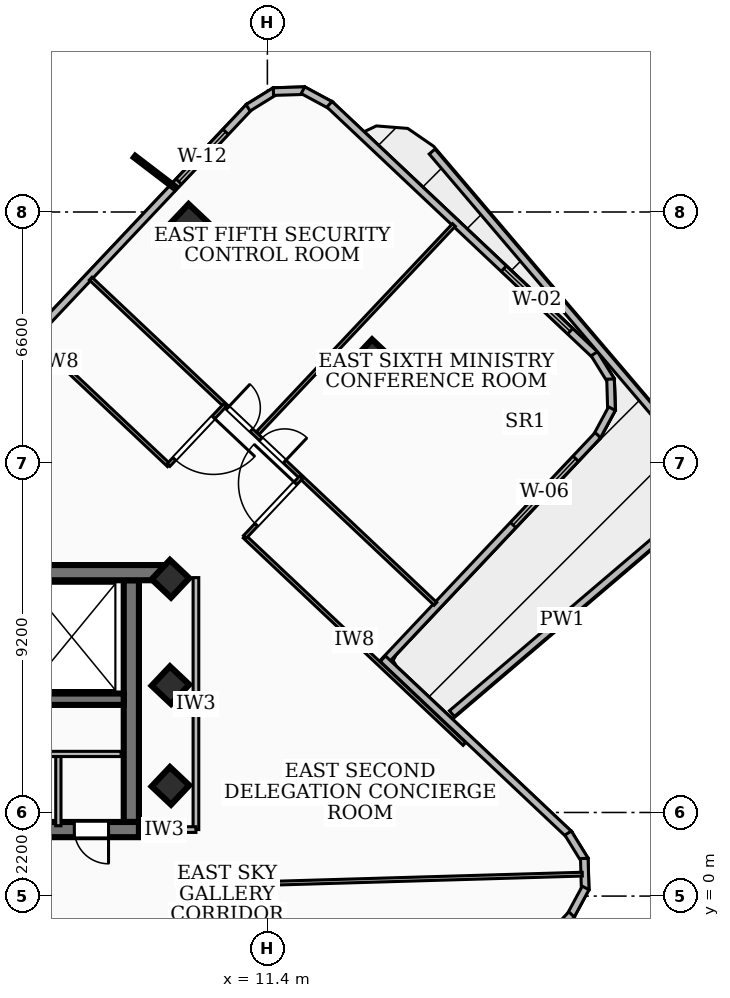
"""IFC4 building model, lengths in metres.
Left out: names, types, materials, properties, quantities, classifications, styles, units other than length and angle.
Written with IfcOpenShell. Run it as: python <this file> out.ifc"""

import sys

from ifc_helpers import new_model, si_unit, direction, frame, frame_2d, origin, origin_2d, place, context, subcontext, project, spatial, rectangle, extrude, element, fill, save


model = new_model("IFC4")
c1 = context("Model", 3, precision=1e-05, world=origin(), true_north=direction((0.0, 1.0)))
c2 = subcontext(c1, "Body", "Model", "MODEL_VIEW")
j1 = project(units=[si_unit("LENGTHUNIT", "METRE"), si_unit("PLANEANGLEUNIT", "RADIAN")], contexts=[c1])
p1 = place(None, origin())
s1 = spatial("IfcSite", under=j1, at=p1, CompositionType="ELEMENT")
p2 = place(p1, origin())
s2 = spatial("IfcBuilding", under=s1, at=p2, CompositionType="ELEMENT")
p3 = place(p2, frame((0.0, 0.0, 244.08)))
s3 = spatial("IfcBuildingStorey", under=s2, at=p3, CompositionType="ELEMENT", Elevation=244.08)
p4 = place(p3, frame((-8.78, 8.51, 0.0), z_axis=(0.0, 0.0, 1.0), x_axis=(1.0, 0.0, 0.0)))
e1 = element("IfcWall", 1, at=p4, inside=s3, PredefinedType="SHEAR", context=c2, shape_type="SweptSolid", body=[
    extrude(rectangle(XDim=17.56, YDim=0.4, at=frame_2d((8.78, 0.0))), origin(), (0.0, 0.0, 1.0), 3.16),
])
p5 = place(p3, frame((8.02, 1.75, 0.0), z_axis=(0.0, 0.0, 1.0), x_axis=(-1.0, 0.0, 0.0)))
e2 = element("IfcWall", 2, at=p5, inside=s3, PredefinedType="SHEAR", context=c2, shape_type="SweptSolid", body=[
    extrude(rectangle(XDim=16.04, YDim=0.4, at=frame_2d((8.02, 0.0))), origin(), (0.0, 0.0, 1.0), 3.16),
])
p6 = place(p5, frame((7.45, 0.0, 0.0)))
e3 = element("IfcOpeningElement", 3, at=p6, cuts=e2, PredefinedType="OPENING", context=c2, shape_type="SweptSolid", body=[
    extrude(rectangle(XDim=1.0, YDim=2.1, at=frame_2d((0.5, 1.05))), frame((0.0, 0.21, 0.0), z_axis=(0.0, -1.0, 0.0), x_axis=(1.0, 0.0, 0.0)), (0.0, 0.0, 1.0), 0.42),
])
p7 = place(p5, frame((14.285, 0.0, 0.0)))
e4 = element("IfcOpeningElement", 4, at=p7, cuts=e2, PredefinedType="OPENING", context=c2, shape_type="SweptSolid", body=[
    extrude(rectangle(XDim=1.05, YDim=2.15, at=frame_2d((0.525, 1.075))), frame((0.0, 0.21, 0.0), z_axis=(0.0, -1.0, 0.0), x_axis=(1.0, 0.0, 0.0)), (0.0, 0.0, 1.0), 0.42),
])
p8 = place(p5, frame((12.725, 0.0, 0.0)))
e5 = element("IfcOpeningElement", 5, at=p8, cuts=e2, PredefinedType="OPENING", context=c2, shape_type="SweptSolid", body=[
    extrude(rectangle(XDim=1.05, YDim=2.15, at=frame_2d((0.525, 1.075))), frame((0.0, 0.21, 0.0), z_axis=(0.0, -1.0, 0.0), x_axis=(1.0, 0.0, 0.0)), (0.0, 0.0, 1.0), 0.42),
])
p9 = place(p5, frame((11.165, 0.0, 0.0)))
e6 = element("IfcOpeningElement", 6, at=p9, cuts=e2, PredefinedType="OPENING", context=c2, shape_type="SweptSolid", body=[
    extrude(rectangle(XDim=1.05, YDim=2.15, at=frame_2d((0.525, 1.075))), frame((0.0, 0.21, 0.0), z_axis=(0.0, -1.0, 0.0), x_axis=(1.0, 0.0, 0.0)), (0.0, 0.0, 1.0), 0.42),
])
p10 = place(p5, frame((3.85, 0.0, 0.0)))
e7 = element("IfcOpeningElement", 7, at=p10, cuts=e2, PredefinedType="OPENING", context=c2, shape_type="SweptSolid", body=[
    extrude(rectangle(XDim=0.9, YDim=2.06, at=frame_2d((0.45, 1.03))), frame((0.0, 0.21, 0.0), z_axis=(0.0, -1.0, 0.0), x_axis=(1.0, 0.0, 0.0)), (0.0, 0.0, 1.0), 0.42),
])
p11 = place(p5, frame((2.35, 0.0, 0.0)))
e8 = element("IfcOpeningElement", 8, at=p11, cuts=e2, PredefinedType="OPENING", context=c2, shape_type="SweptSolid", body=[
    extrude(rectangle(XDim=0.9, YDim=2.06, at=frame_2d((0.45, 1.03))), frame((0.0, 0.21, 0.0), z_axis=(0.0, -1.0, 0.0), x_axis=(1.0, 0.0, 0.0)), (0.0, 0.0, 1.0), 0.42),
])
p12 = place(p5, frame((0.8, 0.0, 0.0)))
e9 = element("IfcOpeningElement", 9, at=p12, cuts=e2, PredefinedType="OPENING", context=c2, shape_type="SweptSolid", body=[
    extrude(rectangle(XDim=0.9, YDim=2.06, at=frame_2d((0.45, 1.03))), frame((0.0, 0.21, 0.0), z_axis=(0.0, -1.0, 0.0), x_axis=(1.0, 0.0, 0.0)), (0.0, 0.0, 1.0), 0.42),
])
p13 = place(p3, frame((7.82, 8.31, 0.0), z_axis=(0.0, 0.0, 1.0), x_axis=(0.0, -1.0, 0.0)))
e10 = element("IfcWall", 10, at=p13, inside=s3, PredefinedType="SHEAR", context=c2, shape_type="SweptSolid", body=[
    extrude(rectangle(XDim=6.36, YDim=0.4, at=frame_2d((3.18, 0.0))), origin(), (0.0, 0.0, 1.0), 3.16),
])
p14 = place(p3, frame((7.62, 5.18, 0.0), z_axis=(0.0, 0.0, 1.0), x_axis=(-1.0, 0.0, 0.0)))
e11 = element("IfcWall", 11, at=p14, inside=s3, PredefinedType="SOLIDWALL", context=c2, shape_type="SweptSolid", body=[
    extrude(rectangle(XDim=15.24, YDim=0.3, at=frame_2d((7.62, 0.0))), origin(), (0.0, 0.0, 1.0), 3.16),
])
p15 = place(p14, frame((5.77, 0.0, 0.0)))
e12 = element("IfcOpeningElement", 12, at=p15, cuts=e11, PredefinedType="OPENING", context=c2, shape_type="SweptSolid", body=[
    extrude(rectangle(XDim=1.1, YDim=2.15, at=frame_2d((0.55, 1.075))), frame((0.0, 0.16, 0.0), z_axis=(0.0, -1.0, 0.0), x_axis=(1.0, 0.0, 0.0)), (0.0, 0.0, 1.0), 0.32),
])
p16 = place(p14, frame((2.97, 0.0, 0.0)))
e13 = element("IfcOpeningElement", 13, at=p16, cuts=e11, PredefinedType="OPENING", context=c2, shape_type="SweptSolid", body=[
    extrude(rectangle(XDim=1.1, YDim=2.15, at=frame_2d((0.55, 1.075))), frame((0.0, 0.16, 0.0), z_axis=(0.0, -1.0, 0.0), x_axis=(1.0, 0.0, 0.0)), (0.0, 0.0, 1.0), 0.32),
])
p17 = place(p14, frame((7.97, 0.0, 0.0)))
e14 = element("IfcOpeningElement", 14, at=p17, cuts=e11, PredefinedType="OPENING", context=c2, shape_type="SweptSolid", body=[
    extrude(rectangle(XDim=1.0, YDim=2.1, at=frame_2d((0.5, 1.05))), frame((0.0, 0.16, 0.0), z_axis=(0.0, -1.0, 0.0), x_axis=(1.0, 0.0, 0.0)), (0.0, 0.0, 1.0), 0.32),
])
for number, where, z_axis, x_axis in (
    (15, (8.85, 2.9, 0.0), (0.0, 0.0, 1.0), (0.686, 0.728, 0.0)),
    (16, (8.85, 5.55, 0.0), (0.0, 0.0, 1.0), (0.686, 0.728, 0.0)),
    (17, (8.85, 8.35, 0.0), (0.0, 0.0, 1.0), (0.686, 0.728, 0.0)),
    (18, (14.169, 14.152, 0.0), (0.0, 0.0, 1.0), (0.686, 0.728, 0.0)),
    (19, (9.341, 17.714, 0.0), (0.0, 0.0, 1.0), (0.686, 0.728, 0.0)),
):
    element("IfcColumn", number, at=place(p3, frame(where, z_axis=z_axis, x_axis=x_axis)), inside=s3, PredefinedType="COLUMN", context=c2, shape_type="SweptSolid", body=[
        extrude(rectangle(XDim=0.7, YDim=0.7, at=origin_2d()), origin(), (0.0, 0.0, 1.0), 3.42),
    ])
p18 = place(p3, frame((5.275, 14.778, 0.0), z_axis=(0.0, 0.0, 1.0), x_axis=(0.686187598971, 0.72742462085, 0.0)))
e20 = element("IfcWall", 20, at=p18, inside=s3, PredefinedType="SOLIDWALL", context=c2, shape_type="SweptSolid", body=[
    extrude(rectangle(XDim=8.241, YDim=0.2, at=frame_2d((4.121, 0.0))), origin(), (0.0, 0.0, 1.0), 3.16),
])
p19 = place(p18, frame((5.528, 0.0, 0.85)))
e21 = element("IfcOpeningElement", 21, at=p19, cuts=e20, PredefinedType="OPENING", context=c2, shape_type="SweptSolid", body=[
    extrude(rectangle(XDim=1.8, YDim=1.6, at=frame_2d((0.9, 0.8))), frame((0.0, 0.11, 0.0), z_axis=(0.0, -1.0, 0.0), x_axis=(1.0, 0.0, 0.0)), (0.0, 0.0, 1.0), 0.22),
])
p20 = place(p3, frame((10.892, 20.742, 0.0), z_axis=(0.0, 0.0, 1.0), x_axis=(0.850997215859, 0.52517019965, 0.0)))
e22 = element("IfcWall", 22, at=p20, inside=s3, PredefinedType="SOLIDWALL", context=c2, shape_type="SweptSolid", body=[
    extrude(rectangle(XDim=0.838, YDim=0.2, at=frame_2d((0.419, 0.0))), origin(), (0.0, 0.0, 1.0), 3.16),
])
p21 = place(p3, frame((11.559, 21.168, 0.0), z_axis=(0.0, 0.0, 1.0), x_axis=(0.999534635062, 0.03050431627, 0.0)))
e23 = element("IfcWall", 23, at=p21, inside=s3, PredefinedType="SOLIDWALL", context=c2, shape_type="SweptSolid", body=[
    extrude(rectangle(XDim=0.824, YDim=0.2, at=frame_2d((0.412, 0.0))), origin(), (0.0, 0.0, 1.0), 3.16),
])
p22 = place(p3, frame((12.336, 21.204, 0.0), z_axis=(0.0, 0.0, 1.0), x_axis=(0.880078176624, -0.474828814447, 0.0)))
e24 = element("IfcWall", 24, at=p22, inside=s3, PredefinedType="SOLIDWALL", context=c2, shape_type="SweptSolid", body=[
    extrude(rectangle(XDim=0.839, YDim=0.2, at=frame_2d((0.419, 0.0))), origin(), (0.0, 0.0, 1.0), 3.16),
])
p23 = place(p3, frame((13.034, 20.835, 0.0), z_axis=(0.0, 0.0, 1.0), x_axis=(0.727480137234, -0.686128741513, 0.0)))
e25 = element("IfcWall", 25, at=p23, inside=s3, PredefinedType="SOLIDWALL", context=c2, shape_type="SweptSolid", body=[
    extrude(rectangle(XDim=9.624, YDim=0.2, at=frame_2d((4.812, 0.0))), origin(), (0.0, 0.0, 1.0), 3.16),
])
p24 = place(p23, frame((6.306, 0.0, 0.85)))
e26 = element("IfcOpeningElement", 26, at=p24, cuts=e25, PredefinedType="OPENING", context=c2, shape_type="SweptSolid", body=[
    extrude(rectangle(XDim=2.4, YDim=2.1, at=frame_2d((1.2, 1.05))), frame((0.0, 0.11, 0.0), z_axis=(0.0, -1.0, 0.0), x_axis=(1.0, 0.0, 0.0)), (0.0, 0.0, 1.0), 0.22),
])
p25 = place(p3, frame((20.004, 14.27, 0.0), z_axis=(0.0, 0.0, 1.0), x_axis=(0.525902672248, -0.85054475445, 0.0)))
e27 = element("IfcWall", 27, at=p25, inside=s3, PredefinedType="SOLIDWALL", context=c2, shape_type="SweptSolid", body=[
    extrude(rectangle(XDim=0.837, YDim=0.2, at=frame_2d((0.418, 0.0))), origin(), (0.0, 0.0, 1.0), 3.16),
])
p26 = place(p3, frame((20.43, 13.604, 0.0), z_axis=(0.0, 0.0, 1.0), x_axis=(0.030468239346, -0.999535735425, 0.0)))
e28 = element("IfcWall", 28, at=p26, inside=s3, PredefinedType="SOLIDWALL", context=c2, shape_type="SweptSolid", body=[
    extrude(rectangle(XDim=0.825, YDim=0.2, at=frame_2d((0.413, 0.0))), origin(), (0.0, 0.0, 1.0), 3.16),
])
p27 = place(p3, frame((20.466, 12.826, 0.0), z_axis=(0.0, 0.0, 1.0), x_axis=(-0.474603278561, -0.880199822755, 0.0)))
e29 = element("IfcWall", 29, at=p27, inside=s3, PredefinedType="SOLIDWALL", context=c2, shape_type="SweptSolid", body=[
    extrude(rectangle(XDim=0.838, YDim=0.2, at=frame_2d((0.419, 0.0))), origin(), (0.0, 0.0, 1.0), 3.16),
])
p28 = place(p3, frame((20.097, 12.128, 0.0), z_axis=(0.0, 0.0, 1.0), x_axis=(-0.686187598971, -0.72742462085, 0.0)))
e30 = element("IfcWall", 30, at=p28, inside=s3, PredefinedType="SOLIDWALL", context=c2, shape_type="SweptSolid", body=[
    extrude(rectangle(XDim=8.241, YDim=0.2, at=frame_2d((4.121, 0.0))), origin(), (0.0, 0.0, 1.0), 3.16),
])
p29 = place(p28, frame((0.85, 0.0, 0.85)))
e31 = element("IfcOpeningElement", 31, at=p29, cuts=e30, PredefinedType="OPENING", context=c2, shape_type="SweptSolid", body=[
    extrude(rectangle(XDim=2.4, YDim=1.85, at=frame_2d((1.2, 0.925))), frame((0.0, 0.11, 0.0), z_axis=(0.0, -1.0, 0.0), x_axis=(1.0, 0.0, 0.0)), (0.0, 0.0, 1.0), 0.22),
])
p30 = place(p3, frame((14.439, 6.246, 0.0), z_axis=(0.0, 0.0, 1.0), x_axis=(0.727497998064, -0.686109803758, 0.0)))
e32 = element("IfcWall", 32, at=p30, inside=s3, PredefinedType="SOLIDWALL", context=c2, shape_type="SweptSolid", body=[
    extrude(rectangle(XDim=6.742, YDim=0.2, at=frame_2d((3.371, 0.0))), origin(), (0.0, 0.0, 1.0), 3.16),
])
p31 = place(p3, frame((19.313, 1.658, 0.0), z_axis=(0.0, 0.0, 1.0), x_axis=(0.52517019965, -0.850997215859, 0.0)))
e33 = element("IfcWall", 33, at=p31, inside=s3, PredefinedType="SOLIDWALL", context=c2, shape_type="SweptSolid", body=[
    extrude(rectangle(XDim=0.838, YDim=0.2, at=frame_2d((0.419, 0.0))), origin(), (0.0, 0.0, 1.0), 3.16),
])
p32 = place(p3, frame((19.739, 0.991, 0.0), z_axis=(0.0, 0.0, 1.0), x_axis=(0.029024803491, -0.999578691641, 0.0)))
e34 = element("IfcWall", 34, at=p32, inside=s3, PredefinedType="SOLIDWALL", context=c2, shape_type="SweptSolid", body=[
    extrude(rectangle(XDim=0.824, YDim=0.2, at=frame_2d((0.412, 0.0))), origin(), (0.0, 0.0, 1.0), 3.16),
])
p33 = place(p3, frame((19.774, 0.214, 0.0), z_axis=(0.0, 0.0, 1.0), x_axis=(-0.474603278561, -0.880199822755, 0.0)))
e35 = element("IfcWall", 35, at=p33, inside=s3, PredefinedType="SOLIDWALL", context=c2, shape_type="SweptSolid", body=[
    extrude(rectangle(XDim=0.838, YDim=0.2, at=frame_2d((0.419, 0.0))), origin(), (0.0, 0.0, 1.0), 3.16),
])
p34 = place(p3, frame((19.405, -0.484, 0.0), z_axis=(0.0, 0.0, 1.0), x_axis=(-0.686028756372, -0.727574426042, 0.0)))
e36 = element("IfcWall", 36, at=p34, inside=s3, PredefinedType="SOLIDWALL", context=c2, shape_type="SweptSolid", body=[
    extrude(rectangle(XDim=6.74, YDim=0.2, at=frame_2d((3.37, 0.0))), origin(), (0.0, 0.0, 1.0), 3.16),
])
p35 = place(p3, frame((16.255, 4.8, 0.0), z_axis=(0.0, 0.0, 1.0), x_axis=(0.761508142909, 0.64815534271, 0.0)))
e37 = element("IfcWall", 37, at=p35, inside=s3, PredefinedType="PARAPET", context=c2, shape_type="SweptSolid", body=[
    extrude(rectangle(XDim=7.631, YDim=0.2, at=frame_2d((3.815, 0.0))), origin(), (0.0, 0.0, 1.0), 0.88),
])
p36 = place(p3, frame((22.243, 11.944, 0.0), z_axis=(0.0, 0.0, 1.0), x_axis=(-0.648152232586, 0.761510790071, 0.0)))
e38 = element("IfcWall", 38, at=p36, inside=s3, PredefinedType="PARAPET", context=c2, shape_type="SweptSolid", body=[
    extrude(rectangle(XDim=10.041, YDim=0.2, at=frame_2d((5.02, 0.0))), origin(), (0.0, 0.0, 1.0), 0.88),
])
p37 = place(p3, frame((2.9, 3.74, 0.0), z_axis=(0.0, 0.0, 1.0), x_axis=(1.0, 0.0, 0.0)))
e39 = element("IfcWall", 39, at=p37, inside=s3, PredefinedType="PARTITIONING", context=c2, shape_type="SweptSolid", body=[
    extrude(rectangle(XDim=4.65, YDim=0.138, at=frame_2d((2.325, 0.0))), origin(), (0.0, 0.0, 1.0), 3.16),
])
p38 = place(p3, frame((5.9, 1.85, 0.0), z_axis=(0.0, 0.0, 1.0), x_axis=(0.0, 1.0, 0.0)))
e40 = element("IfcWall", 40, at=p38, inside=s3, PredefinedType="PARTITIONING", context=c2, shape_type="SweptSolid", body=[
    extrude(rectangle(XDim=1.89, YDim=0.138, at=frame_2d((0.945, 0.0))), origin(), (0.0, 0.0, 1.0), 2.39),
])
p39 = place(p3, frame((9.52, 1.75, 0.0), z_axis=(0.0, 0.0, 1.0), x_axis=(0.0, 1.0, 0.0)))
e41 = element("IfcWall", 41, at=p39, inside=s3, PredefinedType="PARTITIONING", context=c2, shape_type="SweptSolid", body=[
    extrude(rectangle(XDim=6.63, YDim=0.15, at=frame_2d((3.315, 0.0))), origin(), (0.0, 0.0, 1.0), 3.16),
])
p40 = place(p3, frame((7.85, 1.75, 0.0), z_axis=(0.0, 0.0, 1.0), x_axis=(1.0, 0.0, 0.0)))
e42 = element("IfcWall", 42, at=p40, inside=s3, PredefinedType="PARTITIONING", context=c2, shape_type="SweptSolid", body=[
    extrude(rectangle(XDim=1.67, YDim=0.15, at=frame_2d((0.835, 0.0))), origin(), (0.0, 0.0, 1.0), 2.39),
])
p41 = place(p3, frame((11.395, 0.334, 0.0), z_axis=(0.0, 0.0, 1.0), x_axis=(0.999571055306, 0.029286607775, 0.0)))
e43 = element("IfcWall", 43, at=p41, inside=s3, PredefinedType="PARTITIONING", context=c2, shape_type="SweptSolid", body=[
    extrude(rectangle(XDim=8.295, YDim=0.1, at=frame_2d((4.147, 0.0))), origin(), (0.0, 0.0, 1.0), 3.16),
])
p42 = place(p3, frame((8.807, 11.336, 0.0), z_axis=(0.0, 0.0, 1.0), x_axis=(-0.727546923281, 0.68605792352, 0.0)))
e44 = element("IfcWall", 44, at=p42, inside=s3, PredefinedType="PARTITIONING", context=c2, shape_type="SweptSolid", body=[
    extrude(rectangle(XDim=7.95, YDim=0.1, at=frame_2d((3.975, 0.0))), origin(), (0.0, 0.0, 1.0), 3.16),
])
p43 = place(p3, frame((16.585, 4.002, 0.0), z_axis=(0.0, 0.0, 1.0), x_axis=(-0.727485611578, 0.686122937196, 0.0)))
e45 = element("IfcWall", 45, at=p43, inside=s3, PredefinedType="PARTITIONING", context=c2, shape_type="SweptSolid", body=[
    extrude(rectangle(XDim=7.951, YDim=0.1, at=frame_2d((3.975, 0.0))), origin(), (0.0, 0.0, 1.0), 3.16),
])
p44 = place(p3, frame((10.282, 12.915, 0.0), z_axis=(0.0, 0.0, 1.0), x_axis=(-0.685949623464, -0.727649032205, 0.0)))
e46 = element("IfcWall", 46, at=p44, inside=s3, PredefinedType="PARTITIONING", context=c2, shape_type="SweptSolid", body=[
    extrude(rectangle(XDim=2.16, YDim=0.1, at=frame_2d((1.08, 0.0))), origin(), (0.0, 0.0, 1.0), 2.53),
])
p45 = place(p44, frame((0.44, 0.0, 0.0)))
e47 = element("IfcOpeningElement", 47, at=p45, cuts=e46, PredefinedType="OPENING", context=c2, shape_type="SweptSolid", body=[
    extrude(rectangle(XDim=1.5, YDim=2.12, at=frame_2d((0.75, 1.06))), frame((0.0, 0.06, 0.0), z_axis=(0.0, -1.0, 0.0), x_axis=(1.0, 0.0, 0.0)), (0.0, 0.0, 1.0), 0.12),
])
p46 = place(p3, frame((10.808, 9.45, 0.0), z_axis=(0.0, 0.0, 1.0), x_axis=(0.686175284747, 0.727436236795, 0.0)))
e48 = element("IfcWall", 48, at=p46, inside=s3, PredefinedType="PARTITIONING", context=c2, shape_type="SweptSolid", body=[
    extrude(rectangle(XDim=2.16, YDim=0.1, at=frame_2d((1.08, 0.0))), origin(), (0.0, 0.0, 1.0), 3.16),
])
p47 = place(p46, frame((0.44, 0.0, 0.0)))
e49 = element("IfcOpeningElement", 49, at=p47, cuts=e48, PredefinedType="OPENING", context=c2, shape_type="SweptSolid", body=[
    extrude(rectangle(XDim=1.5, YDim=2.12, at=frame_2d((0.75, 1.06))), frame((0.0, 0.06, 0.0), z_axis=(0.0, -1.0, 0.0), x_axis=(1.0, 0.0, 0.0)), (0.0, 0.0, 1.0), 0.12),
])
p48 = place(p3, frame((11.145, 12.183, 0.0), z_axis=(0.0, 0.0, 1.0), x_axis=(0.686088923395, 0.727517689953, 0.0)))
e50 = element("IfcWall", 50, at=p48, inside=s3, PredefinedType="PARTITIONING", context=c2, shape_type="SweptSolid", body=[
    extrude(rectangle(XDim=7.525, YDim=0.1, at=frame_2d((3.763, 0.0))), origin(), (0.0, 0.0, 1.0), 3.16),
])
p49 = place(p3, frame((6.75, 16.246, 0.0), z_axis=(0.0, 0.0, 1.0), x_axis=(0.727488049341, -0.686120352464, 0.0)))
e51 = element("IfcWall", 51, at=p49, inside=s3, PredefinedType="PARTITIONING", context=c2, shape_type="SweptSolid", body=[
    extrude(rectangle(XDim=12.47, YDim=0.1, at=frame_2d((6.235, 0.0))), origin(), (0.0, 0.0, 1.0), 2.53),
])
p50 = place(p49, frame((6.155, 0.0, 0.0)))
e52 = element("IfcOpeningElement", 52, at=p50, cuts=e51, PredefinedType="OPENING", context=c2, shape_type="SweptSolid", body=[
    extrude(rectangle(XDim=0.86, YDim=2.04, at=frame_2d((0.43, 1.02))), frame((0.0, 0.06, 0.0), z_axis=(0.0, -1.0, 0.0), x_axis=(1.0, 0.0, 0.0)), (0.0, 0.0, 1.0), 0.12),
])
p51 = place(p49, frame((4.955, 0.0, 0.0)))
e53 = element("IfcOpeningElement", 53, at=p51, cuts=e51, PredefinedType="OPENING", context=c2, shape_type="SweptSolid", body=[
    extrude(rectangle(XDim=0.86, YDim=2.04, at=frame_2d((0.43, 1.02))), frame((0.0, 0.06, 0.0), z_axis=(0.0, -1.0, 0.0), x_axis=(1.0, 0.0, 0.0)), (0.0, 0.0, 1.0), 0.12),
])
p52 = place(p19, origin())
e54 = element("IfcWindow", 54, at=p52, inside=s3, PartitioningType="SINGLE_PANEL", PredefinedType="WINDOW", context=c2, shape_type="SweptSolid", body=[
    extrude(rectangle(XDim=1.8, YDim=1.6, at=frame_2d((0.9, 0.8))), frame((0.0, 0.03, 0.0), z_axis=(0.0, -1.0, 0.0), x_axis=(1.0, 0.0, 0.0)), (0.0, 0.0, 1.0), 0.06),
])
fill(e21, e54)
p53 = place(p24, origin())
e55 = element("IfcWindow", 55, at=p53, inside=s3, PartitioningType="SINGLE_PANEL", PredefinedType="WINDOW", context=c2, shape_type="SweptSolid", body=[
    extrude(rectangle(XDim=2.4, YDim=2.1, at=frame_2d((1.2, 1.05))), frame((0.0, 0.03, 0.0), z_axis=(0.0, -1.0, 0.0), x_axis=(1.0, 0.0, 0.0)), (0.0, 0.0, 1.0), 0.06),
])
fill(e26, e55)
p54 = place(p29, origin())
e56 = element("IfcWindow", 56, at=p54, inside=s3, PartitioningType="SINGLE_PANEL", PredefinedType="WINDOW", context=c2, shape_type="SweptSolid", body=[
    extrude(rectangle(XDim=2.4, YDim=1.85, at=frame_2d((1.2, 0.925))), frame((0.0, 0.03, 0.0), z_axis=(0.0, -1.0, 0.0), x_axis=(1.0, 0.0, 0.0)), (0.0, 0.0, 1.0), 0.06),
])
fill(e31, e56)
p55 = place(p3, frame((0.0, 0.0, -0.26)))
p56 = place(p55, frame((20.954, 10.661, 0.0)))
p57 = place(p56, frame((0.0, 0.0, 0.21)))
e57 = element("IfcWindow", 57, at=p57, inside=s3, PartitioningType="SINGLE_PANEL", PredefinedType="SKYLIGHT", context=c2, shape_type="SweptSolid", body=[
    extrude(rectangle(XDim=1.2, YDim=1.2, at=origin_2d()), origin(), (0.0, 0.0, 1.0), 0.05),
])
p58 = place(p12, origin())
e58 = element("IfcDoor", 58, at=p58, inside=s3, OperationType="SINGLE_SWING_LEFT", PredefinedType="DOOR", context=c2, shape_type="SweptSolid", body=[
    extrude(rectangle(XDim=0.9, YDim=2.06, at=frame_2d((0.45, 1.03))), frame((0.0, 0.025, 0.0), z_axis=(0.0, -1.0, 0.0), x_axis=(1.0, 0.0, 0.0)), (0.0, 0.0, 1.0), 0.05),
])
fill(e9, e58)
p59 = place(p45, origin())
e59 = element("IfcDoor", 59, at=p59, inside=s3, OperationType="SINGLE_SWING_LEFT", PredefinedType="DOOR", context=c2, shape_type="SweptSolid", body=[
    extrude(rectangle(XDim=1.5, YDim=2.12, at=frame_2d((0.75, 1.06))), frame((0.0, 0.025, 0.0), z_axis=(0.0, -1.0, 0.0), x_axis=(1.0, 0.0, 0.0)), (0.0, 0.0, 1.0), 0.05),
])
fill(e47, e59)
p60 = place(p47, origin())
e60 = element("IfcDoor", 60, at=p60, inside=s3, OperationType="SINGLE_SWING_RIGHT", PredefinedType="DOOR", context=c2, shape_type="SweptSolid", body=[
    extrude(rectangle(XDim=1.5, YDim=2.12, at=frame_2d((0.75, 1.06))), frame((0.0, 0.025, 0.0), z_axis=(0.0, -1.0, 0.0), x_axis=(1.0, 0.0, 0.0)), (0.0, 0.0, 1.0), 0.05),
])
fill(e49, e60)
p61 = place(p50, origin())
e61 = element("IfcDoor", 61, at=p61, inside=s3, OperationType="SINGLE_SWING_RIGHT", PredefinedType="DOOR", context=c2, shape_type="SweptSolid", body=[
    extrude(rectangle(XDim=0.86, YDim=2.04, at=frame_2d((0.43, 1.02))), frame((0.0, 0.025, 0.0), z_axis=(0.0, -1.0, 0.0), x_axis=(1.0, 0.0, 0.0)), (0.0, 0.0, 1.0), 0.05),
])
fill(e52, e61)
p62 = place(p51, origin())
e62 = element("IfcDoor", 62, at=p62, inside=s3, OperationType="SINGLE_SWING_LEFT", PredefinedType="DOOR", context=c2, shape_type="SweptSolid", body=[
    extrude(rectangle(XDim=0.86, YDim=2.04, at=frame_2d((0.43, 1.02))), frame((0.0, 0.025, 0.0), z_axis=(0.0, -1.0, 0.0), x_axis=(1.0, 0.0, 0.0)), (0.0, 0.0, 1.0), 0.05),
])
fill(e53, e62)
save(model, sys.argv[1])
